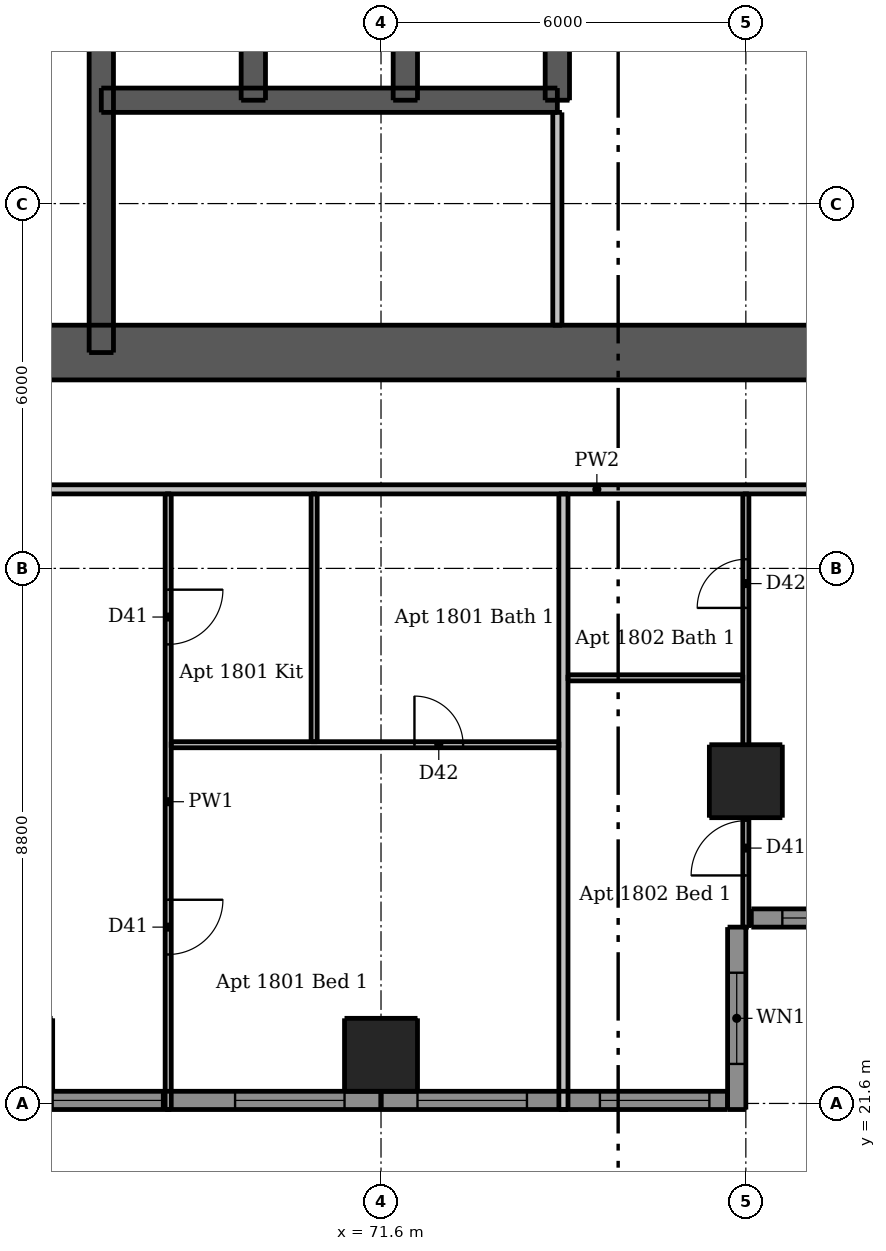
"""IFC4 building model, lengths in metres.
Left out: names, types, materials, properties, quantities, classifications, styles, units other than length and angle.
Written with IfcOpenShell. Run it as: python <this file> out.ifc"""

import sys

from ifc_helpers import new_model, si_unit, direction, frame, frame_2d, origin, origin_2d, place, context, subcontext, project, spatial, rectangle, extrude, element, fill, save


model = new_model("IFC4")
c1 = context("Model", 3, precision=1e-05, world=origin(), true_north=direction((0.0, 1.0)))
c2 = subcontext(c1, "Body", "Model", "MODEL_VIEW")
j1 = project(units=[si_unit("LENGTHUNIT", "METRE"), si_unit("PLANEANGLEUNIT", "RADIAN")], contexts=[c1])
p1 = place(None, origin())
s1 = spatial("IfcSite", under=j1, at=p1, CompositionType="ELEMENT")
p2 = place(p1, origin())
s2 = spatial("IfcBuilding", under=s1, at=p2, CompositionType="ELEMENT")
p3 = place(p2, frame((0.0, 0.0, 66.4)))
s3 = spatial("IfcBuildingStorey", under=s2, at=p3, CompositionType="ELEMENT", Elevation=66.4)
p4 = place(p3, frame((62.5, 33.95, 0.0), z_axis=(0.0, 0.0, 1.0), x_axis=(1.0, 0.0, 0.0)))
e1 = element("IfcWall", 1, at=p4, inside=s3, PredefinedType="SHEAR", context=c2, shape_type="SweptSolid", body=[
    extrude(rectangle(XDim=24.0, YDim=0.9, at=frame_2d((12.0, 0.0))), origin(), (0.0, 0.0, 1.0), 2.95),
])
p5 = place(p4, frame((2.05, 0.0, 0.0)))
e2 = element("IfcOpeningElement", 2, at=p5, cuts=e1, PredefinedType="OPENING", context=c2, shape_type="SweptSolid", body=[
    extrude(rectangle(XDim=1.1, YDim=2.1, at=frame_2d((0.55, 1.05))), frame((0.0, 0.46, 0.0), z_axis=(0.0, -1.0, 0.0), x_axis=(1.0, 0.0, 0.0)), (0.0, 0.0, 1.0), 0.92),
])
p6 = place(p4, frame((20.85, 0.0, 0.0)))
e3 = element("IfcOpeningElement", 3, at=p6, cuts=e1, PredefinedType="OPENING", context=c2, shape_type="SweptSolid", body=[
    extrude(rectangle(XDim=1.1, YDim=2.1, at=frame_2d((0.55, 1.05))), frame((0.0, 0.46, 0.0), z_axis=(0.0, -1.0, 0.0), x_axis=(1.0, 0.0, 0.0)), (0.0, 0.0, 1.0), 0.92),
])
p7 = place(p4, frame((8.0, 0.0, 0.0)))
e4 = element("IfcOpeningElement", 4, at=p7, cuts=e1, PredefinedType="OPENING", context=c2, shape_type="SweptSolid", body=[
    extrude(rectangle(XDim=1.1, YDim=2.1, at=frame_2d((0.55, 1.05))), frame((0.0, 0.46, 0.0), z_axis=(0.0, -1.0, 0.0), x_axis=(1.0, 0.0, 0.0)), (0.0, 0.0, 1.0), 0.92),
])
p8 = place(p4, frame((15.3, 0.0, 0.0)))
e5 = element("IfcOpeningElement", 5, at=p8, cuts=e1, PredefinedType="OPENING", context=c2, shape_type="SweptSolid", body=[
    extrude(rectangle(XDim=0.9, YDim=2.1, at=frame_2d((0.45, 1.05))), frame((0.0, 0.46, 0.0), z_axis=(0.0, -1.0, 0.0), x_axis=(1.0, 0.0, 0.0)), (0.0, 0.0, 1.0), 0.92),
])
p9 = place(p3, frame((67.0, 33.95, 0.0), z_axis=(0.0, 0.0, 1.0), x_axis=(0.0, 1.0, 0.0)))
e6 = element("IfcWall", 6, at=p9, inside=s3, PredefinedType="SHEAR", context=c2, shape_type="SweptSolid", body=[
    extrude(rectangle(XDim=9.95, YDim=0.4, at=frame_2d((4.975, 0.0))), origin(), (0.0, 0.0, 1.0), 2.95),
])
p10 = place(p9, frame((0.65, 0.0, 0.0)))
e7 = element("IfcOpeningElement", 7, at=p10, cuts=e6, PredefinedType="OPENING", context=c2, shape_type="SweptSolid", body=[
    extrude(rectangle(XDim=1.1, YDim=2.1, at=frame_2d((0.55, 1.05))), frame((0.0, 0.21, 0.0), z_axis=(0.0, -1.0, 0.0), x_axis=(1.0, 0.0, 0.0)), (0.0, 0.0, 1.0), 0.42),
])
p11 = place(p3, frame((67.0, 38.1, 0.0), z_axis=(0.0, 0.0, 1.0), x_axis=(1.0, 0.0, 0.0)))
e8 = element("IfcWall", 8, at=p11, inside=s3, PredefinedType="SHEAR", context=c2, shape_type="SweptSolid", body=[
    extrude(rectangle(XDim=7.5, YDim=0.4, at=frame_2d((3.75, 0.0))), origin(), (0.0, 0.0, 1.0), 2.95),
])
p12 = place(p11, frame((0.7, 0.0, 0.0)))
e9 = element("IfcOpeningElement", 9, at=p12, cuts=e8, PredefinedType="OPENING", context=c2, shape_type="SweptSolid", body=[
    extrude(rectangle(XDim=1.1, YDim=2.1, at=frame_2d((0.55, 1.05))), frame((0.0, 0.21, 0.0), z_axis=(0.0, -1.0, 0.0), x_axis=(1.0, 0.0, 0.0)), (0.0, 0.0, 1.0), 0.42),
])
p13 = place(p11, frame((3.2, 0.0, 0.0)))
e10 = element("IfcOpeningElement", 10, at=p13, cuts=e8, PredefinedType="OPENING", context=c2, shape_type="SweptSolid", body=[
    extrude(rectangle(XDim=1.1, YDim=2.1, at=frame_2d((0.55, 1.05))), frame((0.0, 0.21, 0.0), z_axis=(0.0, -1.0, 0.0), x_axis=(1.0, 0.0, 0.0)), (0.0, 0.0, 1.0), 0.42),
])
p14 = place(p11, frame((5.65, 0.0, 0.0)))
e11 = element("IfcOpeningElement", 11, at=p14, cuts=e8, PredefinedType="OPENING", context=c2, shape_type="SweptSolid", body=[
    extrude(rectangle(XDim=1.2, YDim=2.1, at=frame_2d((0.6, 1.05))), frame((0.0, 0.21, 0.0), z_axis=(0.0, -1.0, 0.0), x_axis=(1.0, 0.0, 0.0)), (0.0, 0.0, 1.0), 0.42),
])
for number, where, z_axis, x_axis in (
    (12, (69.5, 38.1, 0.0), (0.0, 0.0, 1.0), (0.0, 1.0, 0.0)),
    (13, (72.0, 38.1, 0.0), (0.0, 0.0, 1.0), (0.0, 1.0, 0.0)),
    (14, (74.5, 38.1, 0.0), (0.0, 0.0, 1.0), (0.0, 1.0, 0.0)),
):
    element("IfcWall", number, at=place(p3, frame(where, z_axis=z_axis, x_axis=x_axis)), inside=s3, PredefinedType="SHEAR", context=c2, shape_type="SweptSolid", body=[
        extrude(rectangle(XDim=2.9, YDim=0.4, at=frame_2d((1.45, 0.0))), origin(), (0.0, 0.0, 1.0), 2.95),
    ])
for number, where, z_axis, x_axis in (
    (15, (65.6, 22.4, 0.0), (0.0, 0.0, 1.0), (1.0, 0.0, 0.0)),
    (16, (71.6, 22.4, 0.0), (0.0, 0.0, 1.0), (1.0, 0.0, 0.0)),
    (17, (77.6, 26.9, 0.0), (0.0, 0.0, 1.0), (1.0, 0.0, 0.0)),
):
    element("IfcColumn", number, at=place(p3, frame(where, z_axis=z_axis, x_axis=x_axis)), inside=s3, PredefinedType="COLUMN", context=c2, shape_type="SweptSolid", body=[
        extrude(rectangle(XDim=1.2, YDim=1.2, at=origin_2d()), origin(), (0.0, 0.0, 1.0), 2.95),
    ])
p15 = place(p3, frame((77.45, 21.5, 0.0), z_axis=(0.0, 0.0, 1.0), x_axis=(0.0, 1.0, 0.0)))
e18 = element("IfcWall", 18, at=p15, inside=s3, PredefinedType="SOLIDWALL", context=c2, shape_type="SweptSolid", body=[
    extrude(rectangle(XDim=3.0, YDim=0.3, at=frame_2d((1.5, 0.0))), origin(), (0.0, 0.0, 1.0), 2.95),
])
p16 = place(p15, frame((0.75, 0.0, 0.9)))
e19 = element("IfcOpeningElement", 19, at=p16, cuts=e18, PredefinedType="OPENING", context=c2, shape_type="SweptSolid", body=[
    extrude(rectangle(XDim=1.5, YDim=1.5, at=frame_2d((0.75, 0.75))), frame((0.0, 0.16, 0.0), z_axis=(0.0, -1.0, 0.0), x_axis=(1.0, 0.0, 0.0)), (0.0, 0.0, 1.0), 0.32),
])
p17 = place(p3, frame((65.6, 21.65, 0.0), z_axis=(0.0, 0.0, 1.0), x_axis=(1.0, 0.0, 0.0)))
e20 = element("IfcWall", 20, at=p17, inside=s3, PredefinedType="SOLIDWALL", context=c2, shape_type="SweptSolid", body=[
    extrude(rectangle(XDim=6.0, YDim=0.3, at=frame_2d((3.0, 0.0))), origin(), (0.0, 0.0, 1.0), 2.341),
])
p18 = place(p17, frame((0.6, 0.0, 0.15)))
e21 = element("IfcOpeningElement", 21, at=p18, cuts=e20, PredefinedType="OPENING", context=c2, shape_type="SweptSolid", body=[
    extrude(rectangle(XDim=1.8, YDim=2.1, at=frame_2d((0.9, 1.05))), frame((0.0, 0.16, 0.0), z_axis=(0.0, -1.0, 0.0), x_axis=(1.0, 0.0, 0.0)), (0.0, 0.0, 1.0), 0.32),
])
p19 = place(p17, frame((3.6, 0.0, 0.15)))
e22 = element("IfcOpeningElement", 22, at=p19, cuts=e20, PredefinedType="OPENING", context=c2, shape_type="SweptSolid", body=[
    extrude(rectangle(XDim=1.8, YDim=2.1, at=frame_2d((0.9, 1.05))), frame((0.0, 0.16, 0.0), z_axis=(0.0, -1.0, 0.0), x_axis=(1.0, 0.0, 0.0)), (0.0, 0.0, 1.0), 0.32),
])
p20 = place(p3, frame((71.6, 21.65, 0.0), z_axis=(0.0, 0.0, 1.0), x_axis=(1.0, 0.0, 0.0)))
e23 = element("IfcWall", 23, at=p20, inside=s3, PredefinedType="SOLIDWALL", context=c2, shape_type="SweptSolid", body=[
    extrude(rectangle(XDim=5.7, YDim=0.3, at=frame_2d((2.85, 0.0))), origin(), (0.0, 0.0, 1.0), 2.341),
])
p21 = place(p20, frame((0.6, 0.0, 0.15)))
e24 = element("IfcOpeningElement", 24, at=p21, cuts=e23, PredefinedType="OPENING", context=c2, shape_type="SweptSolid", body=[
    extrude(rectangle(XDim=1.8, YDim=2.1, at=frame_2d((0.9, 1.05))), frame((0.0, 0.16, 0.0), z_axis=(0.0, -1.0, 0.0), x_axis=(1.0, 0.0, 0.0)), (0.0, 0.0, 1.0), 0.32),
])
p22 = place(p20, frame((3.6, 0.0, 0.15)))
e25 = element("IfcOpeningElement", 25, at=p22, cuts=e23, PredefinedType="OPENING", context=c2, shape_type="SweptSolid", body=[
    extrude(rectangle(XDim=1.8, YDim=2.1, at=frame_2d((0.9, 1.05))), frame((0.0, 0.16, 0.0), z_axis=(0.0, -1.0, 0.0), x_axis=(1.0, 0.0, 0.0)), (0.0, 0.0, 1.0), 0.32),
])
p23 = place(p3, frame((77.69, 24.65, 0.0), z_axis=(0.0, 0.0, 1.0), x_axis=(1.0, 0.0, 0.0)))
e26 = element("IfcWall", 26, at=p23, inside=s3, PredefinedType="SOLIDWALL", context=c2, shape_type="SweptSolid", body=[
    extrude(rectangle(XDim=5.61, YDim=0.3, at=frame_2d((2.805, 0.0))), origin(), (0.0, 0.0, 1.0), 2.95),
])
p24 = place(p23, frame((0.51, 0.0, 0.15)))
e27 = element("IfcOpeningElement", 27, at=p24, cuts=e26, PredefinedType="OPENING", context=c2, shape_type="SweptSolid", body=[
    extrude(rectangle(XDim=1.8, YDim=2.1, at=frame_2d((0.9, 1.05))), frame((0.0, 0.16, 0.0), z_axis=(0.0, -1.0, 0.0), x_axis=(1.0, 0.0, 0.0)), (0.0, 0.0, 1.0), 0.32),
])
p25 = place(p23, frame((3.51, 0.0, 0.15)))
e28 = element("IfcOpeningElement", 28, at=p25, cuts=e26, PredefinedType="OPENING", context=c2, shape_type="SweptSolid", body=[
    extrude(rectangle(XDim=1.8, YDim=2.1, at=frame_2d((0.9, 1.05))), frame((0.0, 0.16, 0.0), z_axis=(0.0, -1.0, 0.0), x_axis=(1.0, 0.0, 0.0)), (0.0, 0.0, 1.0), 0.32),
])
p26 = place(p3, frame((74.5, 34.4, 0.0), z_axis=(0.0, 0.0, 1.0), x_axis=(0.0, 1.0, 0.0)))
e29 = element("IfcWall", 29, at=p26, inside=s3, PredefinedType="PLUMBINGWALL", context=c2, shape_type="SweptSolid", body=[
    extrude(rectangle(XDim=3.5, YDim=0.15, at=frame_2d((1.75, 0.0))), origin(), (0.0, 0.0, 1.0), 2.95),
])
p27 = place(p3, frame((68.1, 31.625, 0.0), z_axis=(0.0, 0.0, 1.0), x_axis=(0.0, -1.0, 0.0)))
e30 = element("IfcWall", 30, at=p27, inside=s3, PredefinedType="PARTITIONING", context=c2, shape_type="SweptSolid", body=[
    extrude(rectangle(XDim=10.125, YDim=0.1, at=frame_2d((5.062, 0.0))), origin(), (0.0, 0.0, 1.0), 2.95),
])
p28 = place(p27, frame((1.575, 0.0, 0.0)))
e31 = element("IfcOpeningElement", 31, at=p28, cuts=e30, PredefinedType="OPENING", context=c2, shape_type="SweptSolid", body=[
    extrude(rectangle(XDim=0.9, YDim=2.1, at=frame_2d((0.45, 1.05))), frame((0.0, 0.06, 0.0), z_axis=(0.0, -1.0, 0.0), x_axis=(1.0, 0.0, 0.0)), (0.0, 0.0, 1.0), 0.12),
])
p29 = place(p27, frame((6.675, 0.0, 0.0)))
e32 = element("IfcOpeningElement", 32, at=p29, cuts=e30, PredefinedType="OPENING", context=c2, shape_type="SweptSolid", body=[
    extrude(rectangle(XDim=0.9, YDim=2.1, at=frame_2d((0.45, 1.05))), frame((0.0, 0.06, 0.0), z_axis=(0.0, -1.0, 0.0), x_axis=(1.0, 0.0, 0.0)), (0.0, 0.0, 1.0), 0.12),
])
p30 = place(p3, frame((70.5, 27.55, 0.0), z_axis=(0.0, 0.0, 1.0), x_axis=(0.0, 1.0, 0.0)))
e33 = element("IfcWall", 33, at=p30, inside=s3, PredefinedType="PARTITIONING", context=c2, shape_type="SweptSolid", body=[
    extrude(rectangle(XDim=4.075, YDim=0.1, at=frame_2d((2.038, 0.0))), origin(), (0.0, 0.0, 1.0), 2.95),
])
p31 = place(p3, frame((77.6, 24.5, 0.0), z_axis=(0.0, 0.0, 1.0), x_axis=(0.0, 1.0, 0.0)))
e34 = element("IfcWall", 34, at=p31, inside=s3, PredefinedType="PARTITIONING", context=c2, shape_type="SweptSolid", body=[
    extrude(rectangle(XDim=7.125, YDim=0.1, at=frame_2d((3.562, 0.0))), origin(), (0.0, 0.0, 1.0), 2.332),
])
p32 = place(p31, frame((0.85, 0.0, 0.0)))
e35 = element("IfcOpeningElement", 35, at=p32, cuts=e34, PredefinedType="OPENING", context=c2, shape_type="SweptSolid", body=[
    extrude(rectangle(XDim=0.9, YDim=2.1, at=frame_2d((0.45, 1.05))), frame((0.0, 0.06, 0.0), z_axis=(0.0, -1.0, 0.0), x_axis=(1.0, 0.0, 0.0)), (0.0, 0.0, 1.0), 0.12),
])
p33 = place(p31, frame((5.25, 0.0, 0.0)))
e36 = element("IfcOpeningElement", 36, at=p33, cuts=e34, PredefinedType="OPENING", context=c2, shape_type="SweptSolid", body=[
    extrude(rectangle(XDim=0.8, YDim=2.1, at=frame_2d((0.4, 1.05))), frame((0.0, 0.06, 0.0), z_axis=(0.0, -1.0, 0.0), x_axis=(1.0, 0.0, 0.0)), (0.0, 0.0, 1.0), 0.12),
])
p34 = place(p3, frame((74.675, 28.6, 0.0), z_axis=(0.0, 0.0, 1.0), x_axis=(1.0, 0.0, 0.0)))
e37 = element("IfcWall", 37, at=p34, inside=s3, PredefinedType="PARTITIONING", context=c2, shape_type="SweptSolid", body=[
    extrude(rectangle(XDim=2.875, YDim=0.1, at=frame_2d((1.438, 0.0))), origin(), (0.0, 0.0, 1.0), 2.95),
])
p35 = place(p3, frame((68.15, 27.5, 0.0), z_axis=(0.0, 0.0, 1.0), x_axis=(1.0, 0.0, 0.0)))
e38 = element("IfcWall", 38, at=p35, inside=s3, PredefinedType="PARTITIONING", context=c2, shape_type="SweptSolid", body=[
    extrude(rectangle(XDim=6.375, YDim=0.1, at=frame_2d((3.188, 0.0))), origin(), (0.0, 0.0, 1.0), 2.95),
])
p36 = place(p35, frame((4.0, 0.0, 0.0)))
e39 = element("IfcOpeningElement", 39, at=p36, cuts=e38, PredefinedType="OPENING", context=c2, shape_type="SweptSolid", body=[
    extrude(rectangle(XDim=0.8, YDim=2.1, at=frame_2d((0.4, 1.05))), frame((0.0, 0.06, 0.0), z_axis=(0.0, -1.0, 0.0), x_axis=(1.0, 0.0, 0.0)), (0.0, 0.0, 1.0), 0.12),
])
p37 = place(p3, frame((74.6, 21.5, 0.0), z_axis=(0.0, 0.0, 1.0), x_axis=(0.0, 1.0, 0.0)))
e40 = element("IfcWall", 40, at=p37, inside=s3, PredefinedType="PARTITIONING", context=c2, shape_type="SweptSolid", body=[
    extrude(rectangle(XDim=10.125, YDim=0.15, at=frame_2d((5.062, 0.0))), origin(), (0.0, 0.0, 1.0), 2.95),
])
p38 = place(p3, frame((89.525, 31.7, 0.0), z_axis=(0.0, 0.0, 1.0), x_axis=(-1.0, 0.0, 0.0)))
e41 = element("IfcWall", 41, at=p38, inside=s3, PredefinedType="PARTITIONING", context=c2, shape_type="SweptSolid", body=[
    extrude(rectangle(XDim=28.75, YDim=0.15, at=frame_2d((14.375, 0.0))), origin(), (0.0, 0.0, 1.0), 2.95),
])
p39 = place(p38, frame((24.625, 0.0, 0.0)))
e42 = element("IfcOpeningElement", 42, at=p39, cuts=e41, PredefinedType="OPENING", context=c2, shape_type="SweptSolid", body=[
    extrude(rectangle(XDim=1.0, YDim=2.1, at=frame_2d((0.5, 1.05))), frame((0.0, 0.085, 0.0), z_axis=(0.0, -1.0, 0.0), x_axis=(1.0, 0.0, 0.0)), (0.0, 0.0, 1.0), 0.17),
])
p40 = place(p38, frame((8.425, 0.0, 0.0)))
e43 = element("IfcOpeningElement", 43, at=p40, cuts=e41, PredefinedType="OPENING", context=c2, shape_type="SweptSolid", body=[
    extrude(rectangle(XDim=1.0, YDim=2.1, at=frame_2d((0.5, 1.05))), frame((0.0, 0.085, 0.0), z_axis=(0.0, -1.0, 0.0), x_axis=(1.0, 0.0, 0.0)), (0.0, 0.0, 1.0), 0.17),
])
p41 = place(p16, origin())
e44 = element("IfcWindow", 44, at=p41, inside=s3, PartitioningType="DOUBLE_PANEL_VERTICAL", PredefinedType="WINDOW", context=c2, shape_type="SweptSolid", body=[
    extrude(rectangle(XDim=1.5, YDim=1.5, at=frame_2d((0.75, 0.75))), frame((0.0, 0.03, 0.0), z_axis=(0.0, -1.0, 0.0), x_axis=(1.0, 0.0, 0.0)), (0.0, 0.0, 1.0), 0.06),
])
fill(e19, e44)
p42 = place(p18, origin())
e45 = element("IfcWindow", 45, at=p42, inside=s3, PartitioningType="DOUBLE_PANEL_VERTICAL", PredefinedType="WINDOW", context=c2, shape_type="SweptSolid", body=[
    extrude(rectangle(XDim=1.8, YDim=2.1, at=frame_2d((0.9, 1.05))), frame((0.0, 0.03, 0.0), z_axis=(0.0, -1.0, 0.0), x_axis=(1.0, 0.0, 0.0)), (0.0, 0.0, 1.0), 0.06),
])
fill(e21, e45)
p43 = place(p19, origin())
e46 = element("IfcWindow", 46, at=p43, inside=s3, PartitioningType="DOUBLE_PANEL_VERTICAL", PredefinedType="WINDOW", context=c2, shape_type="SweptSolid", body=[
    extrude(rectangle(XDim=1.8, YDim=2.1, at=frame_2d((0.9, 1.05))), frame((0.0, 0.03, 0.0), z_axis=(0.0, -1.0, 0.0), x_axis=(1.0, 0.0, 0.0)), (0.0, 0.0, 1.0), 0.06),
])
fill(e22, e46)
p44 = place(p21, origin())
e47 = element("IfcWindow", 47, at=p44, inside=s3, PartitioningType="DOUBLE_PANEL_VERTICAL", PredefinedType="WINDOW", context=c2, shape_type="SweptSolid", body=[
    extrude(rectangle(XDim=1.8, YDim=2.1, at=frame_2d((0.9, 1.05))), frame((0.0, 0.03, 0.0), z_axis=(0.0, -1.0, 0.0), x_axis=(1.0, 0.0, 0.0)), (0.0, 0.0, 1.0), 0.06),
])
fill(e24, e47)
p45 = place(p22, origin())
e48 = element("IfcWindow", 48, at=p45, inside=s3, PartitioningType="DOUBLE_PANEL_VERTICAL", PredefinedType="WINDOW", context=c2, shape_type="SweptSolid", body=[
    extrude(rectangle(XDim=1.8, YDim=2.1, at=frame_2d((0.9, 1.05))), frame((0.0, 0.03, 0.0), z_axis=(0.0, -1.0, 0.0), x_axis=(1.0, 0.0, 0.0)), (0.0, 0.0, 1.0), 0.06),
])
fill(e25, e48)
p46 = place(p24, origin())
e49 = element("IfcWindow", 49, at=p46, inside=s3, PartitioningType="DOUBLE_PANEL_VERTICAL", PredefinedType="WINDOW", context=c2, shape_type="SweptSolid", body=[
    extrude(rectangle(XDim=1.8, YDim=2.1, at=frame_2d((0.9, 1.05))), frame((0.0, 0.03, 0.0), z_axis=(0.0, -1.0, 0.0), x_axis=(1.0, 0.0, 0.0)), (0.0, 0.0, 1.0), 0.06),
])
fill(e27, e49)
p47 = place(p7, origin())
e50 = element("IfcDoor", 50, at=p47, inside=s3, OperationType="SINGLE_SWING_LEFT", PredefinedType="DOOR", context=c2, shape_type="SweptSolid", body=[
    extrude(rectangle(XDim=1.1, YDim=2.1, at=frame_2d((0.55, 1.05))), frame((0.0, 0.438, 0.0), z_axis=(0.0, -1.0, 0.0), x_axis=(1.0, 0.0, 0.0)), (0.0, 0.0, 1.0), 0.05),
])
fill(e4, e50)
p48 = place(p10, origin())
e51 = element("IfcDoor", 51, at=p48, inside=s3, OperationType="SINGLE_SWING_RIGHT", PredefinedType="DOOR", context=c2, shape_type="SweptSolid", body=[
    extrude(rectangle(XDim=1.1, YDim=2.1, at=frame_2d((0.55, 1.05))), frame((0.0, -0.138, 0.0), z_axis=(0.0, -1.0, 0.0), x_axis=(1.0, 0.0, 0.0)), (0.0, 0.0, 1.0), 0.05),
])
fill(e7, e51)
p49 = place(p8, origin())
e52 = element("IfcDoor", 52, at=p49, inside=s3, OperationType="SINGLE_SWING_LEFT", PredefinedType="DOOR", context=c2, shape_type="SweptSolid", body=[
    extrude(rectangle(XDim=0.9, YDim=2.1, at=frame_2d((0.45, 1.05))), frame((0.0, 0.438, 0.0), z_axis=(0.0, -1.0, 0.0), x_axis=(1.0, 0.0, 0.0)), (0.0, 0.0, 1.0), 0.05),
])
fill(e5, e52)
p50 = place(p12, origin())
e53 = element("IfcDoor", 53, at=p50, inside=s3, OperationType="DOUBLE_DOOR_SLIDING", PredefinedType="DOOR", context=c2, shape_type="SweptSolid", body=[
    extrude(rectangle(XDim=1.1, YDim=2.1, at=frame_2d((0.55, 1.05))), frame((0.0, 0.025, 0.0), z_axis=(0.0, -1.0, 0.0), x_axis=(1.0, 0.0, 0.0)), (0.0, 0.0, 1.0), 0.05),
])
fill(e9, e53)
p51 = place(p13, origin())
e54 = element("IfcDoor", 54, at=p51, inside=s3, OperationType="DOUBLE_DOOR_SLIDING", PredefinedType="DOOR", context=c2, shape_type="SweptSolid", body=[
    extrude(rectangle(XDim=1.1, YDim=2.1, at=frame_2d((0.55, 1.05))), frame((0.0, 0.025, 0.0), z_axis=(0.0, -1.0, 0.0), x_axis=(1.0, 0.0, 0.0)), (0.0, 0.0, 1.0), 0.05),
])
fill(e10, e54)
p52 = place(p14, origin())
e55 = element("IfcDoor", 55, at=p52, inside=s3, OperationType="DOUBLE_DOOR_SLIDING", PredefinedType="DOOR", context=c2, shape_type="SweptSolid", body=[
    extrude(rectangle(XDim=1.2, YDim=2.1, at=frame_2d((0.6, 1.05))), frame((0.0, 0.025, 0.0), z_axis=(0.0, -1.0, 0.0), x_axis=(1.0, 0.0, 0.0)), (0.0, 0.0, 1.0), 0.05),
])
fill(e11, e55)
p53 = place(p28, origin())
e56 = element("IfcDoor", 56, at=p53, inside=s3, OperationType="SINGLE_SWING_LEFT", PredefinedType="DOOR", context=c2, shape_type="SweptSolid", body=[
    extrude(rectangle(XDim=0.9, YDim=2.1, at=frame_2d((0.45, 1.05))), frame((0.0, 0.025, 0.0), z_axis=(0.0, -1.0, 0.0), x_axis=(1.0, 0.0, 0.0)), (0.0, 0.0, 1.0), 0.05),
])
fill(e31, e56)
p54 = place(p29, origin())
e57 = element("IfcDoor", 57, at=p54, inside=s3, OperationType="SINGLE_SWING_LEFT", PredefinedType="DOOR", context=c2, shape_type="SweptSolid", body=[
    extrude(rectangle(XDim=0.9, YDim=2.1, at=frame_2d((0.45, 1.05))), frame((0.0, 0.025, 0.0), z_axis=(0.0, -1.0, 0.0), x_axis=(1.0, 0.0, 0.0)), (0.0, 0.0, 1.0), 0.05),
])
fill(e32, e57)
p55 = place(p36, origin())
e58 = element("IfcDoor", 58, at=p55, inside=s3, OperationType="SINGLE_SWING_LEFT", PredefinedType="DOOR", context=c2, shape_type="SweptSolid", body=[
    extrude(rectangle(XDim=0.8, YDim=2.1, at=frame_2d((0.4, 1.05))), frame((0.0, 0.025, 0.0), z_axis=(0.0, -1.0, 0.0), x_axis=(1.0, 0.0, 0.0)), (0.0, 0.0, 1.0), 0.05),
])
fill(e39, e58)
p56 = place(p32, origin())
e59 = element("IfcDoor", 59, at=p56, inside=s3, OperationType="SINGLE_SWING_LEFT", PredefinedType="DOOR", context=c2, shape_type="SweptSolid", body=[
    extrude(rectangle(XDim=0.9, YDim=2.1, at=frame_2d((0.45, 1.05))), frame((0.0, 0.025, 0.0), z_axis=(0.0, -1.0, 0.0), x_axis=(1.0, 0.0, 0.0)), (0.0, 0.0, 1.0), 0.05),
])
fill(e35, e59)
p57 = place(p33, origin())
e60 = element("IfcDoor", 60, at=p57, inside=s3, OperationType="SINGLE_SWING_LEFT", PredefinedType="DOOR", context=c2, shape_type="SweptSolid", body=[
    extrude(rectangle(XDim=0.8, YDim=2.1, at=frame_2d((0.4, 1.05))), frame((0.0, 0.025, 0.0), z_axis=(0.0, -1.0, 0.0), x_axis=(1.0, 0.0, 0.0)), (0.0, 0.0, 1.0), 0.05),
])
fill(e36, e60)
save(model, sys.argv[1])
